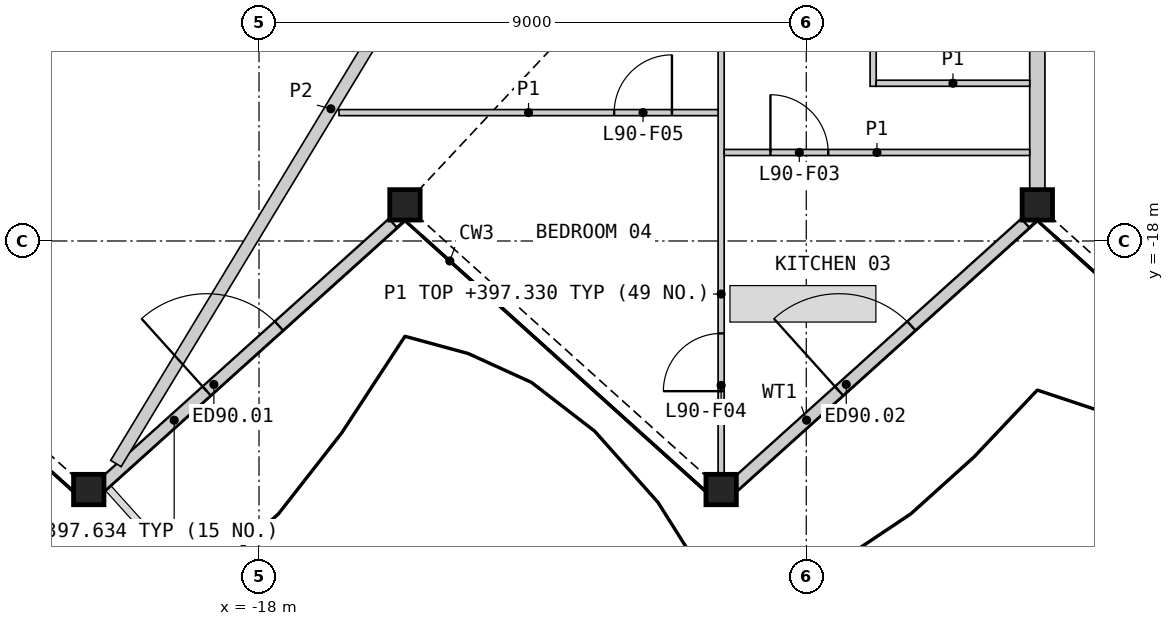
"""IFC4 building model, lengths in metres.
Left out: names, types, materials, properties, quantities, classifications, styles, units other than length and angle.
Written with IfcOpenShell. Run it as: python <this file> out.ifc"""

import sys

from ifc_helpers import new_model, si_unit, direction, frame, frame_2d, origin, origin_2d, place, context, subcontext, project, spatial, rectangle, hollow_rectangle, extrude, element, fill, save


model = new_model("IFC4")
c1 = context("Model", 3, precision=1e-05, world=origin(), true_north=direction((0.0, 1.0)))
c2 = subcontext(c1, "Body", "Model", "MODEL_VIEW")
j1 = project(units=[si_unit("LENGTHUNIT", "METRE"), si_unit("PLANEANGLEUNIT", "RADIAN")], contexts=[c1])
p1 = place(None, origin())
s1 = spatial("IfcSite", under=j1, at=p1, CompositionType="ELEMENT")
p2 = place(p1, origin())
s2 = spatial("IfcBuilding", under=s1, at=p2, CompositionType="ELEMENT")
p3 = place(p2, frame((0.0, 0.0, 395.0)))
s3 = spatial("IfcBuildingStorey", under=s2, at=p3, CompositionType="ELEMENT", Elevation=395.0)
for number, where, z_axis, x_axis in (
    (1, (-20.8, -22.088, 0.0), (0.0, 0.0, 1.0), (1.0, 0.0, 0.0)),
    (2, (-15.6, -17.406, 0.0), (0.0, 0.0, 1.0), (1.0, 0.0, 0.0)),
    (3, (-10.4, -22.088, 0.0), (0.0, 0.0, 1.0), (1.0, 0.0, 0.0)),
    (4, (-5.2, -17.406, 0.0), (0.0, 0.0, 1.0), (1.0, 0.0, 0.0)),
):
    element("IfcColumn", number, at=place(p3, frame(where, z_axis=z_axis, x_axis=x_axis)), inside=s3, PredefinedType="COLUMN", context=c2, shape_type="SweptSolid", body=[
        extrude(hollow_rectangle(XDim=0.5, YDim=0.5, WallThickness=0.03, at=origin_2d()), origin(), (0.0, 0.0, 1.0), 3.4),
    ])
p4 = place(p3, frame((-20.595, -22.028, 0.0), z_axis=(0.0, 0.0, 1.0), x_axis=(0.743153126052, 0.669121387522, 0.0)))
e5 = element("IfcWall", 5, at=p4, inside=s3, PredefinedType="SOLIDWALL", context=c2, shape_type="SweptSolid", body=[
    extrude(rectangle(XDim=6.457, YDim=0.2, at=frame_2d((3.229, 0.0))), origin(), (0.0, 0.0, 1.0), 2.634),
])
p5 = place(p4, frame((2.333, 0.0, 0.0)))
e6 = element("IfcOpeningElement", 6, at=p5, cuts=e5, PredefinedType="OPENING", context=c2, shape_type="SweptSolid", body=[
    extrude(rectangle(XDim=1.6, YDim=2.25, at=frame_2d((0.8, 1.125))), frame((0.0, 0.11, 0.0), z_axis=(0.0, -1.0, 0.0), x_axis=(1.0, 0.0, 0.0)), (0.0, 0.0, 1.0), 0.22),
])
p6 = place(p3, frame((-10.195, -22.028, 0.0), z_axis=(0.0, 0.0, 1.0), x_axis=(0.743136196971, 0.669140189162, 0.0)))
e7 = element("IfcWall", 7, at=p6, inside=s3, PredefinedType="SOLIDWALL", context=c2, shape_type="SweptSolid", body=[
    extrude(rectangle(XDim=6.457, YDim=0.2, at=frame_2d((3.229, 0.0))), origin(), (0.0, 0.0, 1.0), 2.634),
])
p7 = place(p6, frame((2.333, 0.0, 0.0)))
e8 = element("IfcOpeningElement", 8, at=p7, cuts=e7, PredefinedType="OPENING", context=c2, shape_type="SweptSolid", body=[
    extrude(rectangle(XDim=1.6, YDim=2.25, at=frame_2d((0.8, 1.125))), frame((0.0, 0.11, 0.0), z_axis=(0.0, -1.0, 0.0), x_axis=(1.0, 0.0, 0.0)), (0.0, 0.0, 1.0), 0.22),
])
p8 = place(p3, frame((-5.2, -17.146, 0.0), z_axis=(0.0, 0.0, 1.0), x_axis=(0.0, 1.0, 0.0)))
e9 = element("IfcWall", 9, at=p8, inside=s3, PredefinedType="PARTITIONING", context=c2, shape_type="SweptSolid", body=[
    extrude(rectangle(XDim=7.14, YDim=0.25, at=frame_2d((3.57, 0.0))), origin(), (0.0, 0.0, 1.0), 2.33),
])
p9 = place(p3, frame((-20.354, -21.66, 0.0), z_axis=(0.0, 0.0, 1.0), x_axis=(0.518240642668, 0.85523484277, 0.0)))
e10 = element("IfcWall", 10, at=p9, inside=s3, PredefinedType="PARTITIONING", context=c2, shape_type="SweptSolid", body=[
    extrude(rectangle(XDim=13.644, YDim=0.2, at=frame_2d((6.822, 0.0))), origin(), (0.0, 0.0, 1.0), 2.33),
])
p10 = place(p3, frame((-10.4, -21.828, 0.0), z_axis=(0.0, 0.0, 1.0), x_axis=(0.0, 1.0, 0.0)))
e11 = element("IfcWall", 11, at=p10, inside=s3, PredefinedType="PARTITIONING", context=c2, shape_type="SweptSolid", body=[
    extrude(rectangle(XDim=11.822, YDim=0.1, at=frame_2d((5.911, 0.0))), origin(), (0.0, 0.0, 1.0), 2.33),
])
p11 = place(p10, frame((1.358, 0.0, 0.0)))
e12 = element("IfcOpeningElement", 12, at=p11, cuts=e11, PredefinedType="OPENING", context=c2, shape_type="SweptSolid", body=[
    extrude(rectangle(XDim=0.95, YDim=2.1, at=frame_2d((0.475, 1.05))), frame((0.0, 0.06, 0.0), z_axis=(0.0, -1.0, 0.0), x_axis=(1.0, 0.0, 0.0)), (0.0, 0.0, 1.0), 0.12),
])
p12 = place(p3, frame((-16.685, -15.889, 0.0), z_axis=(0.0, 0.0, 1.0), x_axis=(1.0, 0.0, 0.0)))
e13 = element("IfcWall", 13, at=p12, inside=s3, PredefinedType="PARTITIONING", context=c2, shape_type="SweptSolid", body=[
    extrude(rectangle(XDim=6.235, YDim=0.1, at=frame_2d((3.118, 0.0))), origin(), (0.0, 0.0, 1.0), 2.33),
])
p13 = place(p12, frame((4.526, 0.0, 0.0)))
e14 = element("IfcOpeningElement", 14, at=p13, cuts=e13, PredefinedType="OPENING", context=c2, shape_type="SweptSolid", body=[
    extrude(rectangle(XDim=0.95, YDim=2.1, at=frame_2d((0.475, 1.05))), frame((0.0, 0.06, 0.0), z_axis=(0.0, -1.0, 0.0), x_axis=(1.0, 0.0, 0.0)), (0.0, 0.0, 1.0), 0.12),
])
p14 = place(p3, frame((-10.35, -16.544, 0.0), z_axis=(0.0, 0.0, 1.0), x_axis=(1.0, 0.0, 0.0)))
e15 = element("IfcWall", 15, at=p14, inside=s3, PredefinedType="PARTITIONING", context=c2, shape_type="SweptSolid", body=[
    extrude(rectangle(XDim=5.025, YDim=0.1, at=frame_2d((2.513, 0.0))), origin(), (0.0, 0.0, 1.0), 2.33),
])
p15 = place(p14, frame((0.761, 0.0, 0.0)))
e16 = element("IfcOpeningElement", 16, at=p15, cuts=e15, PredefinedType="OPENING", context=c2, shape_type="SweptSolid", body=[
    extrude(rectangle(XDim=0.95, YDim=2.1, at=frame_2d((0.475, 1.05))), frame((0.0, 0.06, 0.0), z_axis=(0.0, -1.0, 0.0), x_axis=(1.0, 0.0, 0.0)), (0.0, 0.0, 1.0), 0.12),
])
p16 = place(p3, frame((-7.9, -15.456, 0.0), z_axis=(0.0, 0.0, 1.0), x_axis=(0.0, 1.0, 0.0)))
e17 = element("IfcWall", 17, at=p16, inside=s3, PredefinedType="PARTITIONING", context=c2, shape_type="SweptSolid", body=[
    extrude(rectangle(XDim=2.9, YDim=0.1, at=frame_2d((1.45, 0.0))), origin(), (0.0, 0.0, 1.0), 2.33),
])
p17 = place(p16, frame((0.975, 0.0, 0.0)))
e18 = element("IfcOpeningElement", 18, at=p17, cuts=e17, PredefinedType="OPENING", context=c2, shape_type="SweptSolid", body=[
    extrude(rectangle(XDim=0.95, YDim=2.1, at=frame_2d((0.475, 1.05))), frame((0.0, 0.06, 0.0), z_axis=(0.0, -1.0, 0.0), x_axis=(1.0, 0.0, 0.0)), (0.0, 0.0, 1.0), 0.12),
])
p18 = place(p3, frame((-7.85, -15.406, 0.0), z_axis=(0.0, 0.0, 1.0), x_axis=(1.0, 0.0, 0.0)))
e19 = element("IfcWall", 19, at=p18, inside=s3, PredefinedType="PARTITIONING", context=c2, shape_type="SweptSolid", body=[
    extrude(rectangle(XDim=2.525, YDim=0.1, at=frame_2d((1.263, 0.0))), origin(), (0.0, 0.0, 1.0), 2.33),
])
p19 = place(p5, origin())
e20 = element("IfcDoor", 20, at=p19, inside=s3, OperationType="DOUBLE_DOOR_SINGLE_SWING", PredefinedType="DOOR", context=c2, shape_type="SweptSolid", body=[
    extrude(rectangle(XDim=1.6, YDim=2.25, at=frame_2d((0.8, 1.125))), frame((0.0, 0.025, 0.0), z_axis=(0.0, -1.0, 0.0), x_axis=(1.0, 0.0, 0.0)), (0.0, 0.0, 1.0), 0.05),
])
fill(e6, e20)
p20 = place(p7, origin())
e21 = element("IfcDoor", 21, at=p20, inside=s3, OperationType="DOUBLE_DOOR_SINGLE_SWING", PredefinedType="DOOR", context=c2, shape_type="SweptSolid", body=[
    extrude(rectangle(XDim=1.6, YDim=2.25, at=frame_2d((0.8, 1.125))), frame((0.0, 0.025, 0.0), z_axis=(0.0, -1.0, 0.0), x_axis=(1.0, 0.0, 0.0)), (0.0, 0.0, 1.0), 0.05),
])
fill(e8, e21)
p21 = place(p15, origin())
e22 = element("IfcDoor", 22, at=p21, inside=s3, OperationType="SINGLE_SWING_LEFT", PredefinedType="DOOR", context=c2, shape_type="SweptSolid", body=[
    extrude(rectangle(XDim=0.95, YDim=2.1, at=frame_2d((0.475, 1.05))), frame((0.0, 0.025, 0.0), z_axis=(0.0, -1.0, 0.0), x_axis=(1.0, 0.0, 0.0)), (0.0, 0.0, 1.0), 0.05),
])
fill(e16, e22)
p22 = place(p11, origin())
e23 = element("IfcDoor", 23, at=p22, inside=s3, OperationType="SINGLE_SWING_LEFT", PredefinedType="DOOR", context=c2, shape_type="SweptSolid", body=[
    extrude(rectangle(XDim=0.95, YDim=2.1, at=frame_2d((0.475, 1.05))), frame((0.0, 0.025, 0.0), z_axis=(0.0, -1.0, 0.0), x_axis=(1.0, 0.0, 0.0)), (0.0, 0.0, 1.0), 0.05),
])
fill(e12, e23)
p23 = place(p13, origin())
e24 = element("IfcDoor", 24, at=p23, inside=s3, OperationType="SINGLE_SWING_RIGHT", PredefinedType="DOOR", context=c2, shape_type="SweptSolid", body=[
    extrude(rectangle(XDim=0.95, YDim=2.1, at=frame_2d((0.475, 1.05))), frame((0.0, 0.025, 0.0), z_axis=(0.0, -1.0, 0.0), x_axis=(1.0, 0.0, 0.0)), (0.0, 0.0, 1.0), 0.05),
])
fill(e14, e24)
save(model, sys.argv[1])
